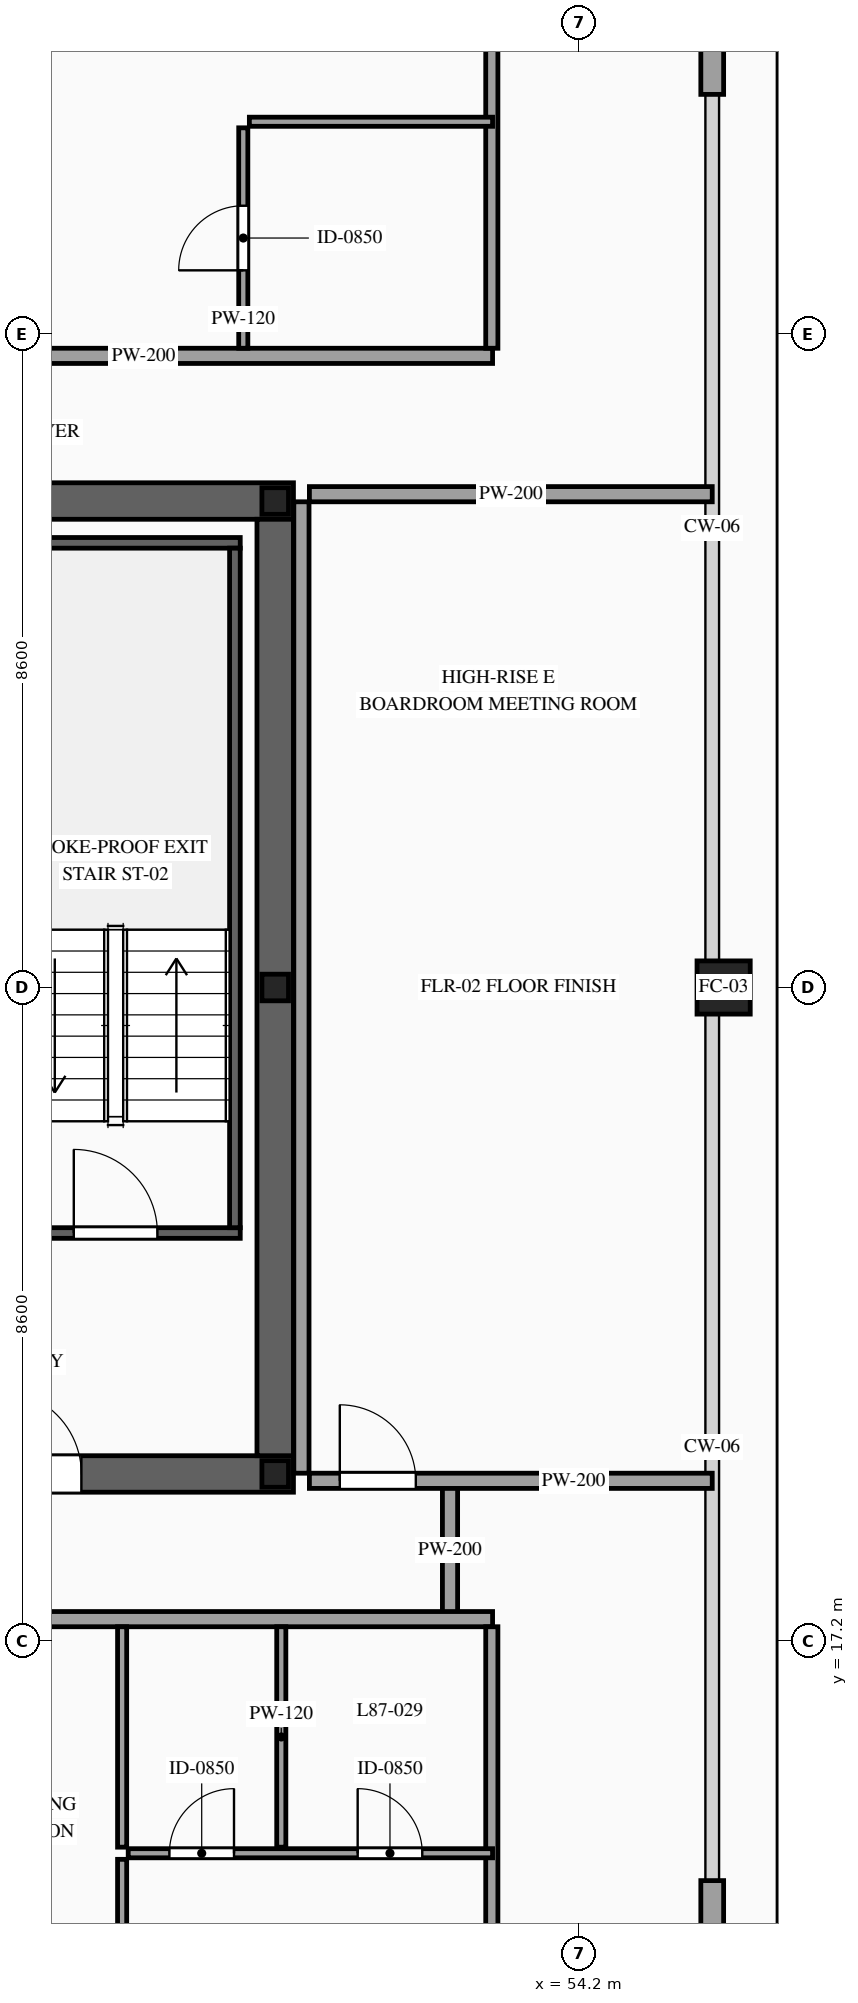
"""IFC4 building model, lengths in metres.
Left out: names, types, materials, properties, quantities, classifications, styles, units other than length and angle.
Written with IfcOpenShell. Run it as: python <this file> out.ifc"""

import sys

from ifc_helpers import new_model, si_unit, direction, frame, frame_2d, origin, origin_2d, place, context, subcontext, project, spatial, rectangle, hollow_rectangle, i_section, extrude, source, transform, mapped, element, fill, save


model = new_model("IFC4")
c1 = context("Model", 3, precision=1e-05, world=origin(), true_north=direction((0.0, 1.0)))
c2 = subcontext(c1, "Body", "Model", "MODEL_VIEW")
j1 = project(units=[si_unit("LENGTHUNIT", "METRE"), si_unit("PLANEANGLEUNIT", "RADIAN")], contexts=[c1])
p1 = place(None, origin())
s1 = spatial("IfcSite", under=j1, at=p1, CompositionType="ELEMENT")
p2 = place(p1, origin())
s2 = spatial("IfcBuilding", under=s1, at=p2, CompositionType="ELEMENT")
p3 = place(p2, frame((0.0, 0.0, 325.2)))
s3 = spatial("IfcBuildingStorey", under=s2, at=p3, CompositionType="ELEMENT", Elevation=325.2)
p4 = place(p3, frame((23.56, 19.4, 0.0), z_axis=(0.0, 0.0, 1.0), x_axis=(1.0, 0.0, 0.0)))
e1 = element("IfcWall", 1, at=p4, inside=s3, PredefinedType="SHEAR", context=c2, shape_type="SweptSolid", body=[
    extrude(rectangle(XDim=26.88, YDim=0.48, at=frame_2d((13.44, 0.0))), origin(), (0.0, 0.0, 1.0), 3.5),
])
p5 = place(p4, frame((1.89, 0.0, 0.0)))
e2 = element("IfcOpeningElement", 2, at=p5, cuts=e1, PredefinedType="OPENING", context=c2, shape_type="SweptSolid", body=[
    extrude(rectangle(XDim=1.1, YDim=2.2, at=frame_2d((0.55, 1.1))), frame((0.0, 0.255, 0.0), z_axis=(0.0, -1.0, 0.0), x_axis=(1.0, 0.0, 0.0)), (0.0, 0.0, 1.0), 0.51),
])
p6 = place(p4, frame((9.79, 0.0, 0.0)))
e3 = element("IfcOpeningElement", 3, at=p6, cuts=e1, PredefinedType="OPENING", context=c2, shape_type="SweptSolid", body=[
    extrude(rectangle(XDim=1.1, YDim=2.2, at=frame_2d((0.55, 1.1))), frame((0.0, 0.255, 0.0), z_axis=(0.0, -1.0, 0.0), x_axis=(1.0, 0.0, 0.0)), (0.0, 0.0, 1.0), 0.51),
])
p7 = place(p4, frame((22.99, 0.0, 0.0)))
e4 = element("IfcOpeningElement", 4, at=p7, cuts=e1, PredefinedType="OPENING", context=c2, shape_type="SweptSolid", body=[
    extrude(rectangle(XDim=1.1, YDim=2.2, at=frame_2d((0.55, 1.1))), frame((0.0, 0.255, 0.0), z_axis=(0.0, -1.0, 0.0), x_axis=(1.0, 0.0, 0.0)), (0.0, 0.0, 1.0), 0.51),
])
p8 = place(p4, frame((19.61, 0.0, 0.0)))
e5 = element("IfcOpeningElement", 5, at=p8, cuts=e1, PredefinedType="OPENING", context=c2, shape_type="SweptSolid", body=[
    extrude(rectangle(XDim=0.9, YDim=2.15, at=frame_2d((0.45, 1.075))), frame((0.0, 0.255, 0.0), z_axis=(0.0, -1.0, 0.0), x_axis=(1.0, 0.0, 0.0)), (0.0, 0.0, 1.0), 0.51),
])
p9 = place(p4, frame((18.17, 0.0, 0.0)))
e6 = element("IfcOpeningElement", 6, at=p9, cuts=e1, PredefinedType="OPENING", context=c2, shape_type="SweptSolid", body=[
    extrude(rectangle(XDim=0.9, YDim=2.15, at=frame_2d((0.45, 1.075))), frame((0.0, 0.255, 0.0), z_axis=(0.0, -1.0, 0.0), x_axis=(1.0, 0.0, 0.0)), (0.0, 0.0, 1.0), 0.51),
])
p10 = place(p3, frame((23.56, 32.2, 0.0), z_axis=(0.0, 0.0, 1.0), x_axis=(1.0, 0.0, 0.0)))
e7 = element("IfcWall", 7, at=p10, inside=s3, PredefinedType="SHEAR", context=c2, shape_type="SweptSolid", body=[
    extrude(rectangle(XDim=26.88, YDim=0.48, at=frame_2d((13.44, 0.0))), origin(), (0.0, 0.0, 1.0), 3.5),
])
p11 = place(p10, frame((4.51, 0.0, 0.0)))
e8 = element("IfcOpeningElement", 8, at=p11, cuts=e7, PredefinedType="OPENING", context=c2, shape_type="SweptSolid", body=[
    extrude(rectangle(XDim=0.9, YDim=2.15, at=frame_2d((0.45, 1.075))), frame((0.0, 0.255, 0.0), z_axis=(0.0, -1.0, 0.0), x_axis=(1.0, 0.0, 0.0)), (0.0, 0.0, 1.0), 0.51),
])
p12 = place(p10, frame((9.79, 0.0, 0.0)))
e9 = element("IfcOpeningElement", 9, at=p12, cuts=e7, PredefinedType="OPENING", context=c2, shape_type="SweptSolid", body=[
    extrude(rectangle(XDim=1.1, YDim=2.2, at=frame_2d((0.55, 1.1))), frame((0.0, 0.255, 0.0), z_axis=(0.0, -1.0, 0.0), x_axis=(1.0, 0.0, 0.0)), (0.0, 0.0, 1.0), 0.51),
])
p13 = place(p10, frame((15.64, 0.0, 0.0)))
e10 = element("IfcOpeningElement", 10, at=p13, cuts=e7, PredefinedType="OPENING", context=c2, shape_type="SweptSolid", body=[
    extrude(rectangle(XDim=1.1, YDim=2.2, at=frame_2d((0.55, 1.1))), frame((0.0, 0.255, 0.0), z_axis=(0.0, -1.0, 0.0), x_axis=(1.0, 0.0, 0.0)), (0.0, 0.0, 1.0), 0.51),
])
p14 = place(p10, frame((18.74, 0.0, 0.0)))
e11 = element("IfcOpeningElement", 11, at=p14, cuts=e7, PredefinedType="OPENING", context=c2, shape_type="SweptSolid", body=[
    extrude(rectangle(XDim=1.1, YDim=2.2, at=frame_2d((0.55, 1.1))), frame((0.0, 0.255, 0.0), z_axis=(0.0, -1.0, 0.0), x_axis=(1.0, 0.0, 0.0)), (0.0, 0.0, 1.0), 0.51),
])
m1 = source(origin(), c2, "Body", "SweptSolid", [
    extrude(rectangle(XDim=12.32, YDim=0.48, at=frame_2d((6.16, 0.0))), origin(), (0.0, 0.0, 1.0), 3.5),
])
p15 = place(p3, frame((50.2, 19.64, 0.0), z_axis=(0.0, 0.0, 1.0), x_axis=(0.0, 1.0, 0.0)))
e12 = element("IfcWall", 12, at=p15, inside=s3, PredefinedType="SHEAR", context=c2, shape_type="MappedRepresentation", body=[
    mapped(m1, transform((0.0, 0.0, 0.0), scale=1.0)),
])
m2 = source(origin(), c2, "Body", "SweptSolid", [
    extrude(i_section(OverallWidth=0.35, OverallDepth=0.35, WebThickness=0.012, FlangeThickness=0.019, at=origin_2d()), origin(), (0.0, 0.0, 1.0), 3.5),
])
for number, where, z_axis, x_axis in (
    (13, (50.2, 19.4, 0.0), (0.0, 0.0, 1.0), (1.0, 0.0, 0.0)),
    (14, (50.2, 25.8, 0.0), (0.0, 0.0, 1.0), (1.0, 0.0, 0.0)),
    (15, (50.2, 32.2, 0.0), (0.0, 0.0, 1.0), (1.0, 0.0, 0.0)),
):
    element("IfcColumn", number, at=place(p3, frame(where, z_axis=z_axis, x_axis=x_axis)), inside=s3, PredefinedType="COLUMN", context=c2, shape_type="MappedRepresentation", body=[
        mapped(m2, transform((0.0, 0.0, 0.0), scale=1.0)),
    ])
m3 = source(origin(), c2, "Body", "SweptSolid", [
    extrude(hollow_rectangle(XDim=0.7, YDim=0.7, WallThickness=0.032, at=origin_2d()), origin(), (0.0, 0.0, 1.0), 3.5),
])
p16 = place(p3, frame((56.1, 25.8, 0.0), z_axis=(0.0, 0.0, 1.0), x_axis=(1.0, 0.0, 0.0)))
e16 = element("IfcColumn", 16, at=p16, inside=s3, PredefinedType="COLUMN", context=c2, shape_type="MappedRepresentation", body=[
    mapped(m3, transform((0.0, 0.0, 0.0), scale=1.0)),
])
m4 = source(origin(), c2, "Body", "SweptSolid", [
    extrude(rectangle(XDim=3.25, YDim=0.3, at=frame_2d((1.625, 0.0))), origin(), (0.0, 0.0, 1.0), 2.885),
])
for number, where, z_axis, x_axis in (
    (17, (55.95, 10.8, 0.0), (0.0, 0.0, 1.0), (0.0, 1.0, 0.0)),
    (18, (55.95, 37.55, 0.0), (0.0, 0.0, 1.0), (0.0, 1.0, 0.0)),
):
    element("IfcWall", number, at=place(p3, frame(where, z_axis=z_axis, x_axis=x_axis)), inside=s3, PredefinedType="SOLIDWALL", context=c2, shape_type="MappedRepresentation", body=[
        mapped(m4, transform((0.0, 0.0, 0.0), scale=1.0)),
    ])
p17 = place(p3, frame((46.46, 22.57, 0.0), z_axis=(0.0, 0.0, 1.0), x_axis=(1.0, 0.0, 0.0)))
e19 = element("IfcWall", 19, at=p17, inside=s3, PredefinedType="SOLIDWALL", context=c2, shape_type="SweptSolid", body=[
    extrude(rectangle(XDim=3.28, YDim=0.14, at=frame_2d((1.64, 0.0))), origin(), (0.0, 0.0, 1.0), 3.28),
])
p18 = place(p17, frame((1.09, 0.0, 0.0)))
e20 = element("IfcOpeningElement", 20, at=p18, cuts=e19, PredefinedType="OPENING", context=c2, shape_type="SweptSolid", body=[
    extrude(rectangle(XDim=1.1, YDim=2.2, at=frame_2d((0.55, 1.1))), frame((0.0, 0.085, 0.0), z_axis=(0.0, -1.0, 0.0), x_axis=(1.0, 0.0, 0.0)), (0.0, 0.0, 1.0), 0.17),
])
m5 = source(origin(), c2, "Body", "SweptSolid", [
    extrude(rectangle(XDim=3.28, YDim=0.14, at=frame_2d((1.64, 0.0))), origin(), (0.0, 0.0, 1.0), 3.28),
])
p19 = place(p3, frame((46.46, 31.65, 0.0), z_axis=(0.0, 0.0, 1.0), x_axis=(1.0, 0.0, 0.0)))
e21 = element("IfcWall", 21, at=p19, inside=s3, PredefinedType="SOLIDWALL", context=c2, shape_type="MappedRepresentation", body=[
    mapped(m5, transform((0.0, 0.0, 0.0), scale=1.0)),
])
m6 = source(origin(), c2, "Body", "SweptSolid", [
    extrude(rectangle(XDim=8.94, YDim=0.14, at=frame_2d((4.47, 0.0))), origin(), (0.0, 0.0, 1.0), 3.28),
])
p20 = place(p3, frame((49.67, 22.64, 0.0), z_axis=(0.0, 0.0, 1.0), x_axis=(0.0, 1.0, 0.0)))
e22 = element("IfcWall", 22, at=p20, inside=s3, PredefinedType="SOLIDWALL", context=c2, shape_type="MappedRepresentation", body=[
    mapped(m6, transform((0.0, 0.0, 0.0), scale=1.0)),
])
m7 = source(origin(), c2, "Body", "SweptSolid", [
    extrude(rectangle(XDim=1.7, YDim=0.2, at=frame_2d((0.85, 0.0))), origin(), (0.0, 0.0, 1.0), 3.28),
])
p21 = place(p3, frame((52.5, 17.55, 0.0), z_axis=(0.0, 0.0, 1.0), x_axis=(0.0, 1.0, 0.0)))
e23 = element("IfcWall", 23, at=p21, inside=s3, PredefinedType="PARTITIONING", context=c2, shape_type="MappedRepresentation", body=[
    mapped(m7, transform((0.0, 0.0, 0.0), scale=1.0)),
])
p22 = place(p3, frame((37.08, 17.49, 0.0), z_axis=(0.0, 0.0, 1.0), x_axis=(1.0, 0.0, 0.0)))
e24 = element("IfcWall", 24, at=p22, inside=s3, PredefinedType="PARTITIONING", context=c2, shape_type="SweptSolid", body=[
    extrude(rectangle(XDim=15.98, YDim=0.2, at=frame_2d((7.99, 0.0))), origin(), (0.0, 0.0, 1.0), 3.28),
])
p23 = place(p22, frame((8.816, 0.0, 0.0)))
e25 = element("IfcOpeningElement", 25, at=p23, cuts=e24, PredefinedType="OPENING", context=c2, shape_type="SweptSolid", body=[
    extrude(rectangle(XDim=1.0, YDim=2.2, at=frame_2d((0.5, 1.1))), frame((0.0, 0.115, 0.0), z_axis=(0.0, -1.0, 0.0), x_axis=(1.0, 0.0, 0.0)), (0.0, 0.0, 1.0), 0.23),
])
m8 = source(origin(), c2, "Body", "SweptSolid", [
    extrude(rectangle(XDim=10.39, YDim=0.16, at=frame_2d((5.195, 0.0))), origin(), (0.0, 0.0, 1.0), 3.28),
])
p24 = place(p3, frame((53.05, 7.0, 0.0), z_axis=(0.0, 0.0, 1.0), x_axis=(0.0, 1.0, 0.0)))
e26 = element("IfcWall", 26, at=p24, inside=s3, PredefinedType="PARTITIONING", context=c2, shape_type="MappedRepresentation", body=[
    mapped(m8, transform((0.0, 0.0, 0.0), scale=1.0)),
])
m9 = source(origin(), c2, "Body", "SweptSolid", [
    extrude(rectangle(XDim=2.9, YDim=0.12, at=frame_2d((1.45, 0.0))), origin(), (0.0, 0.0, 1.0), 2.825),
])
p25 = place(p3, frame((50.28, 14.49, 0.0), z_axis=(0.0, 0.0, 1.0), x_axis=(0.0, 1.0, 0.0)))
e27 = element("IfcWall", 27, at=p25, inside=s3, PredefinedType="PARTITIONING", context=c2, shape_type="MappedRepresentation", body=[
    mapped(m9, transform((0.0, 0.0, 0.0), scale=1.0)),
])
m10 = source(origin(), c2, "Body", "SweptSolid", [
    extrude(rectangle(XDim=2.9, YDim=0.12, at=frame_2d((1.45, 0.0))), origin(), (0.0, 0.0, 1.0), 3.28),
])
p26 = place(p3, frame((48.186, 14.49, 0.0), z_axis=(0.0, 0.0, 1.0), x_axis=(0.0, 1.0, 0.0)))
e28 = element("IfcWall", 28, at=p26, inside=s3, PredefinedType="PARTITIONING", context=c2, shape_type="MappedRepresentation", body=[
    mapped(m10, transform((0.0, 0.0, 0.0), scale=1.0)),
])
p27 = place(p3, frame((48.266, 14.41, 0.0), z_axis=(0.0, 0.0, 1.0), x_axis=(1.0, 0.0, 0.0)))
e29 = element("IfcWall", 29, at=p27, inside=s3, PredefinedType="PARTITIONING", context=c2, shape_type="SweptSolid", body=[
    extrude(rectangle(XDim=4.794, YDim=0.12, at=frame_2d((2.397, 0.0))), origin(), (0.0, 0.0, 1.0), 3.28),
])
p28 = place(p27, frame((3.019, 0.0, 0.0)))
e30 = element("IfcOpeningElement", 30, at=p28, cuts=e29, PredefinedType="OPENING", context=c2, shape_type="SweptSolid", body=[
    extrude(rectangle(XDim=0.85, YDim=2.1, at=frame_2d((0.425, 1.05))), frame((0.0, 0.075, 0.0), z_axis=(0.0, -1.0, 0.0), x_axis=(1.0, 0.0, 0.0)), (0.0, 0.0, 1.0), 0.15),
])
p29 = place(p27, frame((0.542, 0.0, 0.0)))
e31 = element("IfcOpeningElement", 31, at=p29, cuts=e29, PredefinedType="OPENING", context=c2, shape_type="SweptSolid", body=[
    extrude(rectangle(XDim=0.85, YDim=2.1, at=frame_2d((0.425, 1.05))), frame((0.0, 0.075, 0.0), z_axis=(0.0, -1.0, 0.0), x_axis=(1.0, 0.0, 0.0)), (0.0, 0.0, 1.0), 0.15),
])
p30 = place(p3, frame((48.186, 6.85, 0.0), z_axis=(0.0, 0.0, 1.0), x_axis=(0.0, 1.0, 0.0)))
e32 = element("IfcWall", 32, at=p30, inside=s3, PredefinedType="PARTITIONING", context=c2, shape_type="SweptSolid", body=[
    extrude(rectangle(XDim=7.48, YDim=0.12, at=frame_2d((3.74, 0.0))), origin(), (0.0, 0.0, 1.0), 3.28),
])
p31 = place(p30, frame((3.29, 0.0, 0.0)))
e33 = element("IfcOpeningElement", 33, at=p31, cuts=e32, PredefinedType="OPENING", context=c2, shape_type="SweptSolid", body=[
    extrude(rectangle(XDim=0.9, YDim=2.15, at=frame_2d((0.45, 1.075))), frame((0.0, 0.075, 0.0), z_axis=(0.0, -1.0, 0.0), x_axis=(1.0, 0.0, 0.0)), (0.0, 0.0, 1.0), 0.15),
])
p32 = place(p3, frame((36.438, 34.11, 0.0), z_axis=(0.0, 0.0, 1.0), x_axis=(1.0, 0.0, 0.0)))
e34 = element("IfcWall", 34, at=p32, inside=s3, PredefinedType="PARTITIONING", context=c2, shape_type="SweptSolid", body=[
    extrude(rectangle(XDim=16.622, YDim=0.2, at=frame_2d((8.311, 0.0))), origin(), (0.0, 0.0, 1.0), 3.28),
])
p33 = place(p32, frame((6.186, 0.0, 0.0)))
e35 = element("IfcOpeningElement", 35, at=p33, cuts=e34, PredefinedType="OPENING", context=c2, shape_type="SweptSolid", body=[
    extrude(rectangle(XDim=1.0, YDim=2.2, at=frame_2d((0.5, 1.1))), frame((0.0, 0.115, 0.0), z_axis=(0.0, -1.0, 0.0), x_axis=(1.0, 0.0, 0.0)), (0.0, 0.0, 1.0), 0.23),
])
m11 = source(origin(), c2, "Body", "SweptSolid", [
    extrude(rectangle(XDim=10.39, YDim=0.16, at=frame_2d((5.195, 0.0))), origin(), (0.0, 0.0, 1.0), 3.28),
])
p34 = place(p3, frame((53.05, 34.21, 0.0), z_axis=(0.0, 0.0, 1.0), x_axis=(0.0, 1.0, 0.0)))
e36 = element("IfcWall", 36, at=p34, inside=s3, PredefinedType="PARTITIONING", context=c2, shape_type="MappedRepresentation", body=[
    mapped(m11, transform((0.0, 0.0, 0.0), scale=1.0)),
])
m12 = source(origin(), c2, "Body", "SweptSolid", [
    extrude(rectangle(XDim=3.2, YDim=0.12, at=frame_2d((1.6, 0.0))), origin(), (0.0, 0.0, 1.0), 3.28),
])
p35 = place(p3, frame((49.86, 37.19, 0.0), z_axis=(0.0, 0.0, 1.0), x_axis=(1.0, 0.0, 0.0)))
e37 = element("IfcWall", 37, at=p35, inside=s3, PredefinedType="PARTITIONING", context=c2, shape_type="MappedRepresentation", body=[
    mapped(m12, transform((0.0, 0.0, 0.0), scale=1.0)),
])
p36 = place(p3, frame((49.78, 34.21, 0.0), z_axis=(0.0, 0.0, 1.0), x_axis=(0.0, 1.0, 0.0)))
e38 = element("IfcWall", 38, at=p36, inside=s3, PredefinedType="PARTITIONING", context=c2, shape_type="SweptSolid", body=[
    extrude(rectangle(XDim=2.9, YDim=0.12, at=frame_2d((1.45, 0.0))), origin(), (0.0, 0.0, 1.0), 3.28),
])
p37 = place(p36, frame((1.025, 0.0, 0.0)))
e39 = element("IfcOpeningElement", 39, at=p37, cuts=e38, PredefinedType="OPENING", context=c2, shape_type="SweptSolid", body=[
    extrude(rectangle(XDim=0.85, YDim=2.1, at=frame_2d((0.425, 1.05))), frame((0.0, 0.075, 0.0), z_axis=(0.0, -1.0, 0.0), x_axis=(1.0, 0.0, 0.0)), (0.0, 0.0, 1.0), 0.15),
])
p38 = place(p3, frame((50.65, 19.31, 0.0), z_axis=(0.0, 0.0, 1.0), x_axis=(1.0, 0.0, 0.0)))
e40 = element("IfcWall", 40, at=p38, inside=s3, PredefinedType="PARTITIONING", context=c2, shape_type="SweptSolid", body=[
    extrude(rectangle(XDim=5.3, YDim=0.2, at=frame_2d((2.65, 0.0))), origin(), (0.0, 0.0, 1.0), 2.825),
])
p39 = place(p38, frame((0.4, 0.0, 0.0)))
e41 = element("IfcOpeningElement", 41, at=p39, cuts=e40, PredefinedType="OPENING", context=c2, shape_type="SweptSolid", body=[
    extrude(rectangle(XDim=1.0, YDim=2.2, at=frame_2d((0.5, 1.1))), frame((0.0, 0.115, 0.0), z_axis=(0.0, -1.0, 0.0), x_axis=(1.0, 0.0, 0.0)), (0.0, 0.0, 1.0), 0.23),
])
m13 = source(origin(), c2, "Body", "SweptSolid", [
    extrude(rectangle(XDim=5.3, YDim=0.2, at=frame_2d((2.65, 0.0))), origin(), (0.0, 0.0, 1.0), 2.825),
])
p40 = place(p3, frame((50.65, 32.29, 0.0), z_axis=(0.0, 0.0, 1.0), x_axis=(1.0, 0.0, 0.0)))
e42 = element("IfcWall", 42, at=p40, inside=s3, PredefinedType="PARTITIONING", context=c2, shape_type="MappedRepresentation", body=[
    mapped(m13, transform((0.0, 0.0, 0.0), scale=1.0)),
])
m14 = source(origin(), c2, "Body", "SweptSolid", [
    extrude(rectangle(XDim=12.78, YDim=0.2, at=frame_2d((6.39, 0.0))), origin(), (0.0, 0.0, 1.0), 3.28),
])
p41 = place(p3, frame((50.545, 19.41, 0.0), z_axis=(0.0, 0.0, 1.0), x_axis=(0.0, 1.0, 0.0)))
e43 = element("IfcWall", 43, at=p41, inside=s3, PredefinedType="PARTITIONING", context=c2, shape_type="MappedRepresentation", body=[
    mapped(m14, transform((0.0, 0.0, 0.0), scale=1.0)),
])
m15 = source(origin(), c2, "Body", "SweptSolid", [
    extrude(rectangle(XDim=1.1, YDim=2.2, at=frame_2d((0.55, 1.1))), frame((0.0, 0.025, 0.0), z_axis=(0.0, -1.0, 0.0), x_axis=(1.0, 0.0, 0.0)), (0.0, 0.0, 1.0), 0.05),
])
p42 = place(p18, origin())
e44 = element("IfcDoor", 44, at=p42, inside=s3, OperationType="SINGLE_SWING_LEFT", PredefinedType="DOOR", context=c2, shape_type="MappedRepresentation", body=[
    mapped(m15, transform((0.0, 0.0, 0.0), scale=1.0)),
])
fill(e20, e44)
p43 = place(p7, origin())
e45 = element("IfcDoor", 45, at=p43, inside=s3, OperationType="SINGLE_SWING_LEFT", PredefinedType="DOOR", context=c2, shape_type="MappedRepresentation", body=[
    mapped(m15, transform((0.0, 0.0, 0.0), scale=1.0)),
])
fill(e4, e45)
m16 = source(origin(), c2, "Body", "SweptSolid", [
    extrude(rectangle(XDim=0.85, YDim=2.1, at=frame_2d((0.425, 1.05))), frame((0.0, 0.025, 0.0), z_axis=(0.0, -1.0, 0.0), x_axis=(1.0, 0.0, 0.0)), (0.0, 0.0, 1.0), 0.05),
])
p44 = place(p28, origin())
e46 = element("IfcDoor", 46, at=p44, inside=s3, OperationType="SINGLE_SWING_LEFT", PredefinedType="DOOR", context=c2, shape_type="MappedRepresentation", body=[
    mapped(m16, transform((0.0, 0.0, 0.0), scale=1.0)),
])
fill(e30, e46)
p45 = place(p29, origin())
e47 = element("IfcDoor", 47, at=p45, inside=s3, OperationType="SINGLE_SWING_RIGHT", PredefinedType="DOOR", context=c2, shape_type="MappedRepresentation", body=[
    mapped(m16, transform((0.0, 0.0, 0.0), scale=1.0)),
])
fill(e31, e47)
p46 = place(p37, origin())
e48 = element("IfcDoor", 48, at=p46, inside=s3, OperationType="SINGLE_SWING_LEFT", PredefinedType="DOOR", context=c2, shape_type="MappedRepresentation", body=[
    mapped(m16, transform((0.0, 0.0, 0.0), scale=1.0)),
])
fill(e39, e48)
m17 = source(origin(), c2, "Body", "SweptSolid", [
    extrude(rectangle(XDim=1.0, YDim=2.2, at=frame_2d((0.5, 1.1))), frame((0.0, 0.025, 0.0), z_axis=(0.0, -1.0, 0.0), x_axis=(1.0, 0.0, 0.0)), (0.0, 0.0, 1.0), 0.05),
])
p47 = place(p39, origin())
e49 = element("IfcDoor", 49, at=p47, inside=s3, OperationType="SINGLE_SWING_LEFT", PredefinedType="DOOR", context=c2, shape_type="MappedRepresentation", body=[
    mapped(m17, transform((0.0, 0.0, 0.0), scale=1.0)),
])
fill(e41, e49)
save(model, sys.argv[1])
